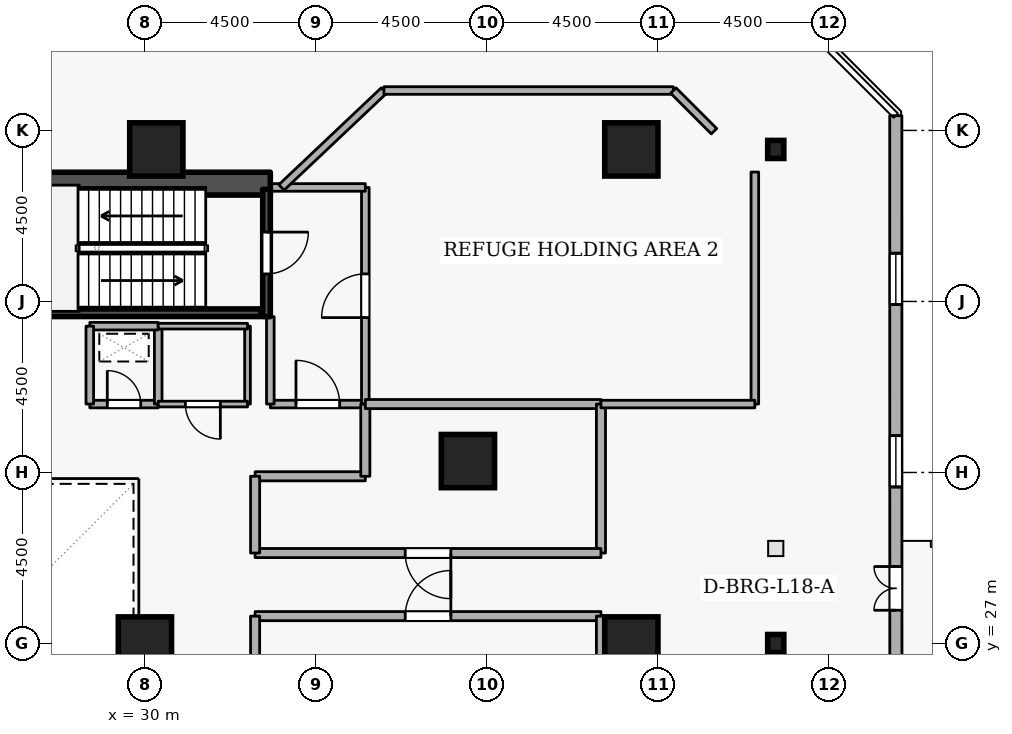
"""IFC4 building model, lengths in metres.
Left out: names, types, materials, properties, quantities, classifications, styles, units other than length and angle.
Written with IfcOpenShell. Run it as: python <this file> out.ifc"""

import sys

from ifc_helpers import new_model, si_unit, direction, frame, frame_2d, origin, origin_2d, place, context, subcontext, project, spatial, rectangle, i_section, extrude, element, fill, save


model = new_model("IFC4")
c1 = context("Model", 3, precision=1e-05, world=origin(), true_north=direction((0.0, 1.0)))
c2 = subcontext(c1, "Body", "Model", "MODEL_VIEW")
j1 = project(units=[si_unit("LENGTHUNIT", "METRE"), si_unit("PLANEANGLEUNIT", "RADIAN")], contexts=[c1])
p1 = place(None, origin())
s1 = spatial("IfcSite", under=j1, at=p1, CompositionType="ELEMENT")
p2 = place(p1, origin())
s2 = spatial("IfcBuilding", under=s1, at=p2, CompositionType="ELEMENT")
p3 = place(p2, frame((0.0, 0.0, 71.7)))
s3 = spatial("IfcBuildingStorey", under=s2, at=p3, CompositionType="ELEMENT", Elevation=71.7)
p4 = place(p3, frame((17.7, 39.1, 0.0), z_axis=(0.0, 0.0, 1.0), x_axis=(1.0, 0.0, 0.0)))
e1 = element("IfcWall", 1, at=p4, inside=s3, PredefinedType="SHEAR", context=c2, shape_type="SweptSolid", body=[
    extrude(rectangle(XDim=15.6, YDim=0.6, at=frame_2d((7.8, 0.0))), origin(), (0.0, 0.0, 1.0), 4.2),
])
for number, where, z_axis, x_axis in (
    (2, (42.8, 27.0, 0.0), (0.0, 0.0, 1.0), (1.0, 0.0, 0.0)),
    (3, (42.8, 40.0, 0.0), (0.0, 0.0, 1.0), (1.0, 0.0, 0.0)),
    (4, (38.5, 31.8, 0.0), (0.0, 0.0, 1.0), (1.0, 0.0, 0.0)),
    (5, (30.3, 40.0, 0.0), (0.0, 0.0, 1.0), (1.0, 0.0, 0.0)),
    (6, (30.0, 27.0, 0.0), (0.0, 0.0, 1.0), (1.0, 0.0, 0.0)),
):
    element("IfcColumn", number, at=place(p3, frame(where, z_axis=z_axis, x_axis=x_axis)), inside=s3, PredefinedType="COLUMN", context=c2, shape_type="SweptSolid", body=[
        extrude(rectangle(XDim=1.4, YDim=1.4, at=origin_2d()), origin(), (0.0, 0.0, 1.0), 4.2),
    ])
for number, where, z_axis, x_axis in (
    (7, (46.6, 27.0, 0.0), (0.0, 0.0, 1.0), (1.0, 0.0, 0.0)),
    (8, (46.6, 40.0, 0.0), (0.0, 0.0, 1.0), (1.0, 0.0, 0.0)),
):
    element("IfcColumn", number, at=place(p3, frame(where, z_axis=z_axis, x_axis=x_axis)), inside=s3, PredefinedType="COLUMN", context=c2, shape_type="SweptSolid", body=[
        extrude(i_section(OverallWidth=0.424, OverallDepth=0.475, WebThickness=0.048, FlangeThickness=0.077, FilletRadius=0.015, at=origin_2d()), origin(), (0.0, 0.0, 1.0), 4.2),
    ])
p5 = place(p3, frame((49.765, 5.319, 0.0), z_axis=(0.0, 0.0, 1.0), x_axis=(-0.000164732205, 0.999999986432, 0.0)))
e9 = element("IfcWall", 9, at=p5, inside=s3, PredefinedType="STANDARD", context=c2, shape_type="SweptSolid", body=[
    extrude(rectangle(XDim=35.569, YDim=0.32, at=frame_2d((17.785, 0.0))), origin(), (0.0, 0.0, 1.0), 2.24),
])
p6 = place(p5, frame((22.556, 0.0, 0.0)))
e10 = element("IfcOpeningElement", 10, at=p6, cuts=e9, PredefinedType="OPENING", context=c2, shape_type="SweptSolid", body=[
    extrude(rectangle(XDim=1.15, YDim=2.1, at=frame_2d((0.575, 1.05))), frame((0.0, 0.17, 0.0), z_axis=(0.0, -1.0, 0.0), x_axis=(1.0, 0.0, 0.0)), (0.0, 0.0, 1.0), 0.34),
])
p7 = place(p5, frame((1.8, 0.0, 0.72)))
e11 = element("IfcOpeningElement", 11, at=p7, cuts=e9, PredefinedType="OPENING", context=c2, shape_type="SweptSolid", body=[
    extrude(rectangle(XDim=1.35, YDim=1.05, at=frame_2d((0.675, 0.525))), frame((0.0, 0.17, 0.0), z_axis=(0.0, -1.0, 0.0), x_axis=(1.0, 0.0, 0.0)), (0.0, 0.0, 1.0), 0.34),
])
p8 = place(p5, frame((6.6, 0.0, 0.72)))
e12 = element("IfcOpeningElement", 12, at=p8, cuts=e9, PredefinedType="OPENING", context=c2, shape_type="SweptSolid", body=[
    extrude(rectangle(XDim=1.35, YDim=1.05, at=frame_2d((0.675, 0.525))), frame((0.0, 0.17, 0.0), z_axis=(0.0, -1.0, 0.0), x_axis=(1.0, 0.0, 0.0)), (0.0, 0.0, 1.0), 0.34),
])
p9 = place(p5, frame((11.4, 0.0, 0.72)))
e13 = element("IfcOpeningElement", 13, at=p9, cuts=e9, PredefinedType="OPENING", context=c2, shape_type="SweptSolid", body=[
    extrude(rectangle(XDim=1.35, YDim=1.05, at=frame_2d((0.675, 0.525))), frame((0.0, 0.17, 0.0), z_axis=(0.0, -1.0, 0.0), x_axis=(1.0, 0.0, 0.0)), (0.0, 0.0, 1.0), 0.34),
])
p10 = place(p5, frame((16.2, 0.0, 0.72)))
e14 = element("IfcOpeningElement", 14, at=p10, cuts=e9, PredefinedType="OPENING", context=c2, shape_type="SweptSolid", body=[
    extrude(rectangle(XDim=1.35, YDim=1.05, at=frame_2d((0.675, 0.525))), frame((0.0, 0.17, 0.0), z_axis=(0.0, -1.0, 0.0), x_axis=(1.0, 0.0, 0.0)), (0.0, 0.0, 1.0), 0.34),
])
p11 = place(p5, frame((25.8, 0.0, 0.72)))
e15 = element("IfcOpeningElement", 15, at=p11, cuts=e9, PredefinedType="OPENING", context=c2, shape_type="SweptSolid", body=[
    extrude(rectangle(XDim=1.35, YDim=1.05, at=frame_2d((0.675, 0.525))), frame((0.0, 0.17, 0.0), z_axis=(0.0, -1.0, 0.0), x_axis=(1.0, 0.0, 0.0)), (0.0, 0.0, 1.0), 0.34),
])
p12 = place(p5, frame((30.6, 0.0, 0.72)))
e16 = element("IfcOpeningElement", 16, at=p12, cuts=e9, PredefinedType="OPENING", context=c2, shape_type="SweptSolid", body=[
    extrude(rectangle(XDim=1.35, YDim=1.05, at=frame_2d((0.675, 0.525))), frame((0.0, 0.17, 0.0), z_axis=(0.0, -1.0, 0.0), x_axis=(1.0, 0.0, 0.0)), (0.0, 0.0, 1.0), 0.34),
])
p13 = place(p3, frame((33.2, 38.95, 0.0), z_axis=(0.0, 0.0, 1.0), x_axis=(0.0, -1.0, 0.0)))
e17 = element("IfcWall", 17, at=p13, inside=s3, PredefinedType="SHEAR", context=c2, shape_type="SweptSolid", body=[
    extrude(rectangle(XDim=3.35, YDim=0.2, at=frame_2d((1.675, 0.0))), origin(), (0.0, 0.0, 1.0), 4.2),
])
p14 = place(p13, frame((1.125, 0.0, 0.0)))
e18 = element("IfcOpeningElement", 18, at=p14, cuts=e17, PredefinedType="OPENING", context=c2, shape_type="SweptSolid", body=[
    extrude(rectangle(XDim=1.1, YDim=2.1, at=frame_2d((0.55, 1.05))), frame((0.0, 0.11, 0.0), z_axis=(0.0, -1.0, 0.0), x_axis=(1.0, 0.0, 0.0)), (0.0, 0.0, 1.0), 0.22),
])
p15 = place(p3, frame((25.95, 35.703, 0.0), z_axis=(0.0, 0.0, 1.0), x_axis=(1.0, 0.0, 0.0)))
e19 = element("IfcWall", 19, at=p15, inside=s3, PredefinedType="SHEAR", context=c2, shape_type="SweptSolid", body=[
    extrude(rectangle(XDim=7.1, YDim=0.2, at=frame_2d((3.55, 0.0))), origin(), (0.0, 0.0, 1.0), 4.2),
])
p16 = place(p3, frame((33.3, 33.3, 0.0), z_axis=(0.0, 0.0, 1.0), x_axis=(1.0, 0.0, 0.0)))
e20 = element("IfcWall", 20, at=p16, inside=s3, PredefinedType="STANDARD", context=c2, shape_type="SweptSolid", body=[
    extrude(rectangle(XDim=2.5, YDim=0.2, at=frame_2d((1.25, 0.0))), origin(), (0.0, 0.0, 1.0), 3.86),
])
p17 = place(p16, frame((0.675, 0.0, 0.0)))
e21 = element("IfcOpeningElement", 21, at=p17, cuts=e20, PredefinedType="OPENING", context=c2, shape_type="SweptSolid", body=[
    extrude(rectangle(XDim=1.15, YDim=2.1, at=frame_2d((0.575, 1.05))), frame((0.0, 0.11, 0.0), z_axis=(0.0, -1.0, 0.0), x_axis=(1.0, 0.0, 0.0)), (0.0, 0.0, 1.0), 0.22),
])
p18 = place(p3, frame((35.8, 33.3, 0.0), z_axis=(0.0, 0.0, 1.0), x_axis=(0.0, 1.0, 0.0)))
e22 = element("IfcWall", 22, at=p18, inside=s3, PredefinedType="STANDARD", context=c2, shape_type="SweptSolid", body=[
    extrude(rectangle(XDim=5.7, YDim=0.2, at=frame_2d((2.85, 0.0))), origin(), (0.0, 0.0, 1.0), 3.86),
])
p19 = place(p18, frame((2.275, 0.0, 0.0)))
e23 = element("IfcOpeningElement", 23, at=p19, cuts=e22, PredefinedType="OPENING", context=c2, shape_type="SweptSolid", body=[
    extrude(rectangle(XDim=1.15, YDim=2.1, at=frame_2d((0.575, 1.05))), frame((0.0, 0.11, 0.0), z_axis=(0.0, -1.0, 0.0), x_axis=(1.0, 0.0, 0.0)), (0.0, 0.0, 1.0), 0.22),
])
p20 = place(p3, frame((35.8, 39.0, 0.0), z_axis=(0.0, 0.0, 1.0), x_axis=(-1.0, 0.0, 0.0)))
e24 = element("IfcWall", 24, at=p20, inside=s3, PredefinedType="STANDARD", context=c2, shape_type="SweptSolid", body=[
    extrude(rectangle(XDim=2.5, YDim=0.2, at=frame_2d((1.25, 0.0))), origin(), (0.0, 0.0, 1.0), 3.86),
])
p21 = place(p3, frame((33.3, 35.6, 0.0), z_axis=(0.0, 0.0, 1.0), x_axis=(0.0, -1.0, 0.0)))
e25 = element("IfcWall", 25, at=p21, inside=s3, PredefinedType="STANDARD", context=c2, shape_type="SweptSolid", body=[
    extrude(rectangle(XDim=2.3, YDim=0.2, at=frame_2d((1.15, 0.0))), origin(), (0.0, 0.0, 1.0), 3.065),
])
p22 = place(p3, frame((28.55, 33.3, 0.0), z_axis=(0.0, 0.0, 1.0), x_axis=(1.0, 0.0, 0.0)))
e26 = element("IfcWall", 26, at=p22, inside=s3, PredefinedType="STANDARD", context=c2, shape_type="SweptSolid", body=[
    extrude(rectangle(XDim=1.8, YDim=0.2, at=frame_2d((0.9, 0.0))), origin(), (0.0, 0.0, 1.0), 3.86),
])
p23 = place(p22, frame((0.46, 0.0, 0.0)))
e27 = element("IfcOpeningElement", 27, at=p23, cuts=e26, PredefinedType="OPENING", context=c2, shape_type="SweptSolid", body=[
    extrude(rectangle(XDim=0.88, YDim=2.04, at=frame_2d((0.44, 1.02))), frame((0.0, 0.11, 0.0), z_axis=(0.0, -1.0, 0.0), x_axis=(1.0, 0.0, 0.0)), (0.0, 0.0, 1.0), 0.22),
])
p24 = place(p3, frame((30.35, 33.3, 0.0), z_axis=(0.0, 0.0, 1.0), x_axis=(0.0, 1.0, 0.0)))
e28 = element("IfcWall", 28, at=p24, inside=s3, PredefinedType="STANDARD", context=c2, shape_type="SweptSolid", body=[
    extrude(rectangle(XDim=2.05, YDim=0.2, at=frame_2d((1.025, 0.0))), origin(), (0.0, 0.0, 1.0), 3.86),
])
p25 = place(p3, frame((30.35, 35.35, 0.0), z_axis=(0.0, 0.0, 1.0), x_axis=(-1.0, 0.0, 0.0)))
e29 = element("IfcWall", 29, at=p25, inside=s3, PredefinedType="STANDARD", context=c2, shape_type="SweptSolid", body=[
    extrude(rectangle(XDim=1.8, YDim=0.2, at=frame_2d((0.9, 0.0))), origin(), (0.0, 0.0, 1.0), 3.86),
])
p26 = place(p3, frame((28.55, 35.35, 0.0), z_axis=(0.0, 0.0, 1.0), x_axis=(0.0, -1.0, 0.0)))
e30 = element("IfcWall", 30, at=p26, inside=s3, PredefinedType="STANDARD", context=c2, shape_type="SweptSolid", body=[
    extrude(rectangle(XDim=2.05, YDim=0.2, at=frame_2d((1.025, 0.0))), origin(), (0.0, 0.0, 1.0), 3.86),
])
p27 = place(p3, frame((32.9, 27.72, 0.0), z_axis=(0.0, 0.0, 1.0), x_axis=(1.0, 0.0, 0.0)))
e31 = element("IfcWall", 31, at=p27, inside=s3, PredefinedType="STANDARD", context=c2, shape_type="SweptSolid", body=[
    extrude(rectangle(XDim=9.1, YDim=0.24, at=frame_2d((4.55, 0.0))), origin(), (0.0, 0.0, 1.0), 3.86),
])
p28 = place(p27, frame((3.95, 0.0, 0.0)))
e32 = element("IfcOpeningElement", 32, at=p28, cuts=e31, PredefinedType="OPENING", context=c2, shape_type="SweptSolid", body=[
    extrude(rectangle(XDim=1.2, YDim=2.1, at=frame_2d((0.6, 1.05))), frame((0.0, 0.13, 0.0), z_axis=(0.0, -1.0, 0.0), x_axis=(1.0, 0.0, 0.0)), (0.0, 0.0, 1.0), 0.26),
])
p29 = place(p3, frame((42.0, 27.72, 0.0), z_axis=(0.0, 0.0, 1.0), x_axis=(0.0, -1.0, 0.0)))
e33 = element("IfcWall", 33, at=p29, inside=s3, PredefinedType="STANDARD", context=c2, shape_type="SweptSolid", body=[
    extrude(rectangle(XDim=5.12, YDim=0.24, at=frame_2d((2.56, 0.0))), origin(), (0.0, 0.0, 1.0), 3.86),
])
p30 = place(p3, frame((32.9, 22.6, 0.0), z_axis=(0.0, 0.0, 1.0), x_axis=(0.0, 1.0, 0.0)))
e34 = element("IfcWall", 34, at=p30, inside=s3, PredefinedType="STANDARD", context=c2, shape_type="SweptSolid", body=[
    extrude(rectangle(XDim=5.12, YDim=0.24, at=frame_2d((2.56, 0.0))), origin(), (0.0, 0.0, 1.0), 3.065),
])
p31 = place(p3, frame((32.9, 31.4, 0.0), z_axis=(0.0, 0.0, 1.0), x_axis=(1.0, 0.0, 0.0)))
e35 = element("IfcWall", 35, at=p31, inside=s3, PredefinedType="STANDARD", context=c2, shape_type="SweptSolid", body=[
    extrude(rectangle(XDim=2.9, YDim=0.24, at=frame_2d((1.45, 0.0))), origin(), (0.0, 0.0, 1.0), 3.86),
])
p32 = place(p3, frame((35.8, 31.4, 0.0), z_axis=(0.0, 0.0, 1.0), x_axis=(0.0, 1.0, 0.0)))
e36 = element("IfcWall", 36, at=p32, inside=s3, PredefinedType="STANDARD", context=c2, shape_type="SweptSolid", body=[
    extrude(rectangle(XDim=1.9, YDim=0.24, at=frame_2d((0.95, 0.0))), origin(), (0.0, 0.0, 1.0), 3.86),
])
p33 = place(p3, frame((35.8, 33.3, 0.0), z_axis=(0.0, 0.0, 1.0), x_axis=(1.0, 0.0, 0.0)))
e37 = element("IfcWall", 37, at=p33, inside=s3, PredefinedType="STANDARD", context=c2, shape_type="SweptSolid", body=[
    extrude(rectangle(XDim=6.2, YDim=0.24, at=frame_2d((3.1, 0.0))), origin(), (0.0, 0.0, 1.0), 3.86),
])
p34 = place(p3, frame((42.0, 33.3, 0.0), z_axis=(0.0, 0.0, 1.0), x_axis=(0.0, -1.0, 0.0)))
e38 = element("IfcWall", 38, at=p34, inside=s3, PredefinedType="STANDARD", context=c2, shape_type="SweptSolid", body=[
    extrude(rectangle(XDim=3.92, YDim=0.24, at=frame_2d((1.96, 0.0))), origin(), (0.0, 0.0, 1.0), 3.86),
])
p35 = place(p3, frame((42.0, 29.38, 0.0), z_axis=(0.0, 0.0, 1.0), x_axis=(-1.0, 0.0, 0.0)))
e39 = element("IfcWall", 39, at=p35, inside=s3, PredefinedType="STANDARD", context=c2, shape_type="SweptSolid", body=[
    extrude(rectangle(XDim=9.1, YDim=0.24, at=frame_2d((4.55, 0.0))), origin(), (0.0, 0.0, 1.0), 3.86),
])
p36 = place(p35, frame((3.95, 0.0, 0.0)))
e40 = element("IfcOpeningElement", 40, at=p36, cuts=e39, PredefinedType="OPENING", context=c2, shape_type="SweptSolid", body=[
    extrude(rectangle(XDim=1.2, YDim=2.1, at=frame_2d((0.6, 1.05))), frame((0.0, 0.13, 0.0), z_axis=(0.0, -1.0, 0.0), x_axis=(1.0, 0.0, 0.0)), (0.0, 0.0, 1.0), 0.26),
])
p37 = place(p3, frame((32.9, 29.38, 0.0), z_axis=(0.0, 0.0, 1.0), x_axis=(0.0, 1.0, 0.0)))
e41 = element("IfcWall", 41, at=p37, inside=s3, PredefinedType="STANDARD", context=c2, shape_type="SweptSolid", body=[
    extrude(rectangle(XDim=2.02, YDim=0.24, at=frame_2d((1.01, 0.0))), origin(), (0.0, 0.0, 1.0), 3.065),
])
p38 = place(p3, frame((33.593, 39.0, 0.0), z_axis=(0.0, 0.0, 1.0), x_axis=(0.726628146433, 0.68703095768, 0.0)))
e42 = element("IfcWall", 42, at=p38, inside=s3, PredefinedType="STANDARD", context=c2, shape_type="SweptSolid", body=[
    extrude(rectangle(XDim=3.712, YDim=0.2, at=frame_2d((1.856, 0.0))), origin(), (0.0, 0.0, 1.0), 3.86),
])
p39 = place(p3, frame((36.29, 41.55, 0.0), z_axis=(0.0, 0.0, 1.0), x_axis=(1.0, 0.0, 0.0)))
e43 = element("IfcWall", 43, at=p39, inside=s3, PredefinedType="STANDARD", context=c2, shape_type="SweptSolid", body=[
    extrude(rectangle(XDim=7.615, YDim=0.2, at=frame_2d((3.808, 0.0))), origin(), (0.0, 0.0, 1.0), 3.365),
])
p40 = place(p3, frame((43.905, 41.55, 0.0), z_axis=(0.0, 0.0, 1.0), x_axis=(0.707106781187, -0.707106781187, 0.0)))
e44 = element("IfcWall", 44, at=p40, inside=s3, PredefinedType="STANDARD", context=c2, shape_type="SweptSolid", body=[
    extrude(rectangle(XDim=1.513, YDim=0.2, at=frame_2d((0.757, 0.0))), origin(), (0.0, 0.0, 1.0), 3.86),
])
p41 = place(p3, frame((46.05, 39.405, 0.0), z_axis=(0.0, 0.0, 1.0), x_axis=(0.0, -1.0, 0.0)))
e45 = element("IfcWall", 45, at=p41, inside=s3, PredefinedType="STANDARD", context=c2, shape_type="SweptSolid", body=[
    extrude(rectangle(XDim=6.105, YDim=0.2, at=frame_2d((3.053, 0.0))), origin(), (0.0, 0.0, 1.0), 3.86),
])
p42 = place(p3, frame((46.05, 33.3, 0.0), z_axis=(0.0, 0.0, 1.0), x_axis=(-1.0, 0.0, 0.0)))
e46 = element("IfcWall", 46, at=p42, inside=s3, PredefinedType="STANDARD", context=c2, shape_type="SweptSolid", body=[
    extrude(rectangle(XDim=4.05, YDim=0.2, at=frame_2d((2.025, 0.0))), origin(), (0.0, 0.0, 1.0), 3.86),
])
p43 = place(p3, frame((32.7, 35.35, 0.0), z_axis=(0.0, 0.0, 1.0), x_axis=(0.0, -1.0, 0.0)))
e47 = element("IfcWall", 47, at=p43, inside=s3, PredefinedType="PARTITIONING", context=c2, shape_type="SweptSolid", body=[
    extrude(rectangle(XDim=2.05, YDim=0.15, at=frame_2d((1.025, 0.0))), origin(), (0.0, 0.0, 1.0), 3.065),
])
p44 = place(p3, frame((32.7, 33.3, 0.0), z_axis=(0.0, 0.0, 1.0), x_axis=(-1.0, 0.0, 0.0)))
e48 = element("IfcWall", 48, at=p44, inside=s3, PredefinedType="PARTITIONING", context=c2, shape_type="SweptSolid", body=[
    extrude(rectangle(XDim=2.35, YDim=0.15, at=frame_2d((1.175, 0.0))), origin(), (0.0, 0.0, 1.0), 3.86),
])
p45 = place(p44, frame((0.715, 0.0, 0.0)))
e49 = element("IfcOpeningElement", 49, at=p45, cuts=e48, PredefinedType="OPENING", context=c2, shape_type="SweptSolid", body=[
    extrude(rectangle(XDim=0.92, YDim=2.08, at=frame_2d((0.46, 1.04))), frame((0.0, 0.085, 0.0), z_axis=(0.0, -1.0, 0.0), x_axis=(1.0, 0.0, 0.0)), (0.0, 0.0, 1.0), 0.17),
])
p46 = place(p3, frame((30.35, 35.35, 0.0), z_axis=(0.0, 0.0, 1.0), x_axis=(1.0, 0.0, 0.0)))
e50 = element("IfcWall", 50, at=p46, inside=s3, PredefinedType="PARTITIONING", context=c2, shape_type="SweptSolid", body=[
    extrude(rectangle(XDim=2.35, YDim=0.15, at=frame_2d((1.175, 0.0))), origin(), (0.0, 0.0, 1.0), 3.86),
])
p47 = place(p6, origin())
e51 = element("IfcDoor", 51, at=p47, inside=s3, OperationType="DOUBLE_DOOR_SINGLE_SWING", PredefinedType="DOOR", context=c2, shape_type="SweptSolid", body=[
    extrude(rectangle(XDim=1.15, YDim=2.1, at=frame_2d((0.575, 1.05))), frame((0.0, 0.025, 0.0), z_axis=(0.0, -1.0, 0.0), x_axis=(1.0, 0.0, 0.0)), (0.0, 0.0, 1.0), 0.05),
])
fill(e10, e51)
p48 = place(p11, origin())
e52 = element("IfcWindow", 52, at=p48, inside=s3, PartitioningType="SINGLE_PANEL", PredefinedType="WINDOW", context=c2, shape_type="SweptSolid", body=[
    extrude(rectangle(XDim=1.35, YDim=1.05, at=frame_2d((0.675, 0.525))), frame((0.0, 0.03, 0.0), z_axis=(0.0, -1.0, 0.0), x_axis=(1.0, 0.0, 0.0)), (0.0, 0.0, 1.0), 0.06),
])
fill(e15, e52)
p49 = place(p12, origin())
e53 = element("IfcWindow", 53, at=p49, inside=s3, PartitioningType="SINGLE_PANEL", PredefinedType="WINDOW", context=c2, shape_type="SweptSolid", body=[
    extrude(rectangle(XDim=1.35, YDim=1.05, at=frame_2d((0.675, 0.525))), frame((0.0, 0.03, 0.0), z_axis=(0.0, -1.0, 0.0), x_axis=(1.0, 0.0, 0.0)), (0.0, 0.0, 1.0), 0.06),
])
fill(e16, e53)
p50 = place(p14, origin())
e54 = element("IfcDoor", 54, at=p50, inside=s3, OperationType="SINGLE_SWING_LEFT", PredefinedType="DOOR", context=c2, shape_type="SweptSolid", body=[
    extrude(rectangle(XDim=1.1, YDim=2.1, at=frame_2d((0.55, 1.05))), frame((0.0, 0.025, 0.0), z_axis=(0.0, -1.0, 0.0), x_axis=(1.0, 0.0, 0.0)), (0.0, 0.0, 1.0), 0.05),
])
fill(e18, e54)
p51 = place(p17, origin())
e55 = element("IfcDoor", 55, at=p51, inside=s3, OperationType="SINGLE_SWING_LEFT", PredefinedType="DOOR", context=c2, shape_type="SweptSolid", body=[
    extrude(rectangle(XDim=1.15, YDim=2.1, at=frame_2d((0.575, 1.05))), frame((0.0, 0.025, 0.0), z_axis=(0.0, -1.0, 0.0), x_axis=(1.0, 0.0, 0.0)), (0.0, 0.0, 1.0), 0.05),
])
fill(e21, e55)
p52 = place(p23, origin())
e56 = element("IfcDoor", 56, at=p52, inside=s3, OperationType="SINGLE_SWING_LEFT", PredefinedType="DOOR", context=c2, shape_type="SweptSolid", body=[
    extrude(rectangle(XDim=0.88, YDim=2.04, at=frame_2d((0.44, 1.02))), frame((0.0, 0.025, 0.0), z_axis=(0.0, -1.0, 0.0), x_axis=(1.0, 0.0, 0.0)), (0.0, 0.0, 1.0), 0.05),
])
fill(e27, e56)
p53 = place(p45, origin())
e57 = element("IfcDoor", 57, at=p53, inside=s3, OperationType="SINGLE_SWING_LEFT", PredefinedType="DOOR", context=c2, shape_type="SweptSolid", body=[
    extrude(rectangle(XDim=0.92, YDim=2.08, at=frame_2d((0.46, 1.04))), frame((0.0, 0.025, 0.0), z_axis=(0.0, -1.0, 0.0), x_axis=(1.0, 0.0, 0.0)), (0.0, 0.0, 1.0), 0.05),
])
fill(e49, e57)
p54 = place(p28, origin())
e58 = element("IfcDoor", 58, at=p54, inside=s3, OperationType="SINGLE_SWING_RIGHT", PredefinedType="DOOR", context=c2, shape_type="SweptSolid", body=[
    extrude(rectangle(XDim=1.2, YDim=2.1, at=frame_2d((0.6, 1.05))), frame((0.0, 0.025, 0.0), z_axis=(0.0, -1.0, 0.0), x_axis=(1.0, 0.0, 0.0)), (0.0, 0.0, 1.0), 0.05),
])
fill(e32, e58)
p55 = place(p36, origin())
e59 = element("IfcDoor", 59, at=p55, inside=s3, OperationType="SINGLE_SWING_LEFT", PredefinedType="DOOR", context=c2, shape_type="SweptSolid", body=[
    extrude(rectangle(XDim=1.2, YDim=2.1, at=frame_2d((0.6, 1.05))), frame((0.0, 0.025, 0.0), z_axis=(0.0, -1.0, 0.0), x_axis=(1.0, 0.0, 0.0)), (0.0, 0.0, 1.0), 0.05),
])
fill(e40, e59)
p56 = place(p19, origin())
e60 = element("IfcDoor", 60, at=p56, inside=s3, OperationType="SINGLE_SWING_LEFT", PredefinedType="DOOR", context=c2, shape_type="SweptSolid", body=[
    extrude(rectangle(XDim=1.15, YDim=2.1, at=frame_2d((0.575, 1.05))), frame((0.0, 0.025, 0.0), z_axis=(0.0, -1.0, 0.0), x_axis=(1.0, 0.0, 0.0)), (0.0, 0.0, 1.0), 0.05),
])
fill(e23, e60)
save(model, sys.argv[1])
